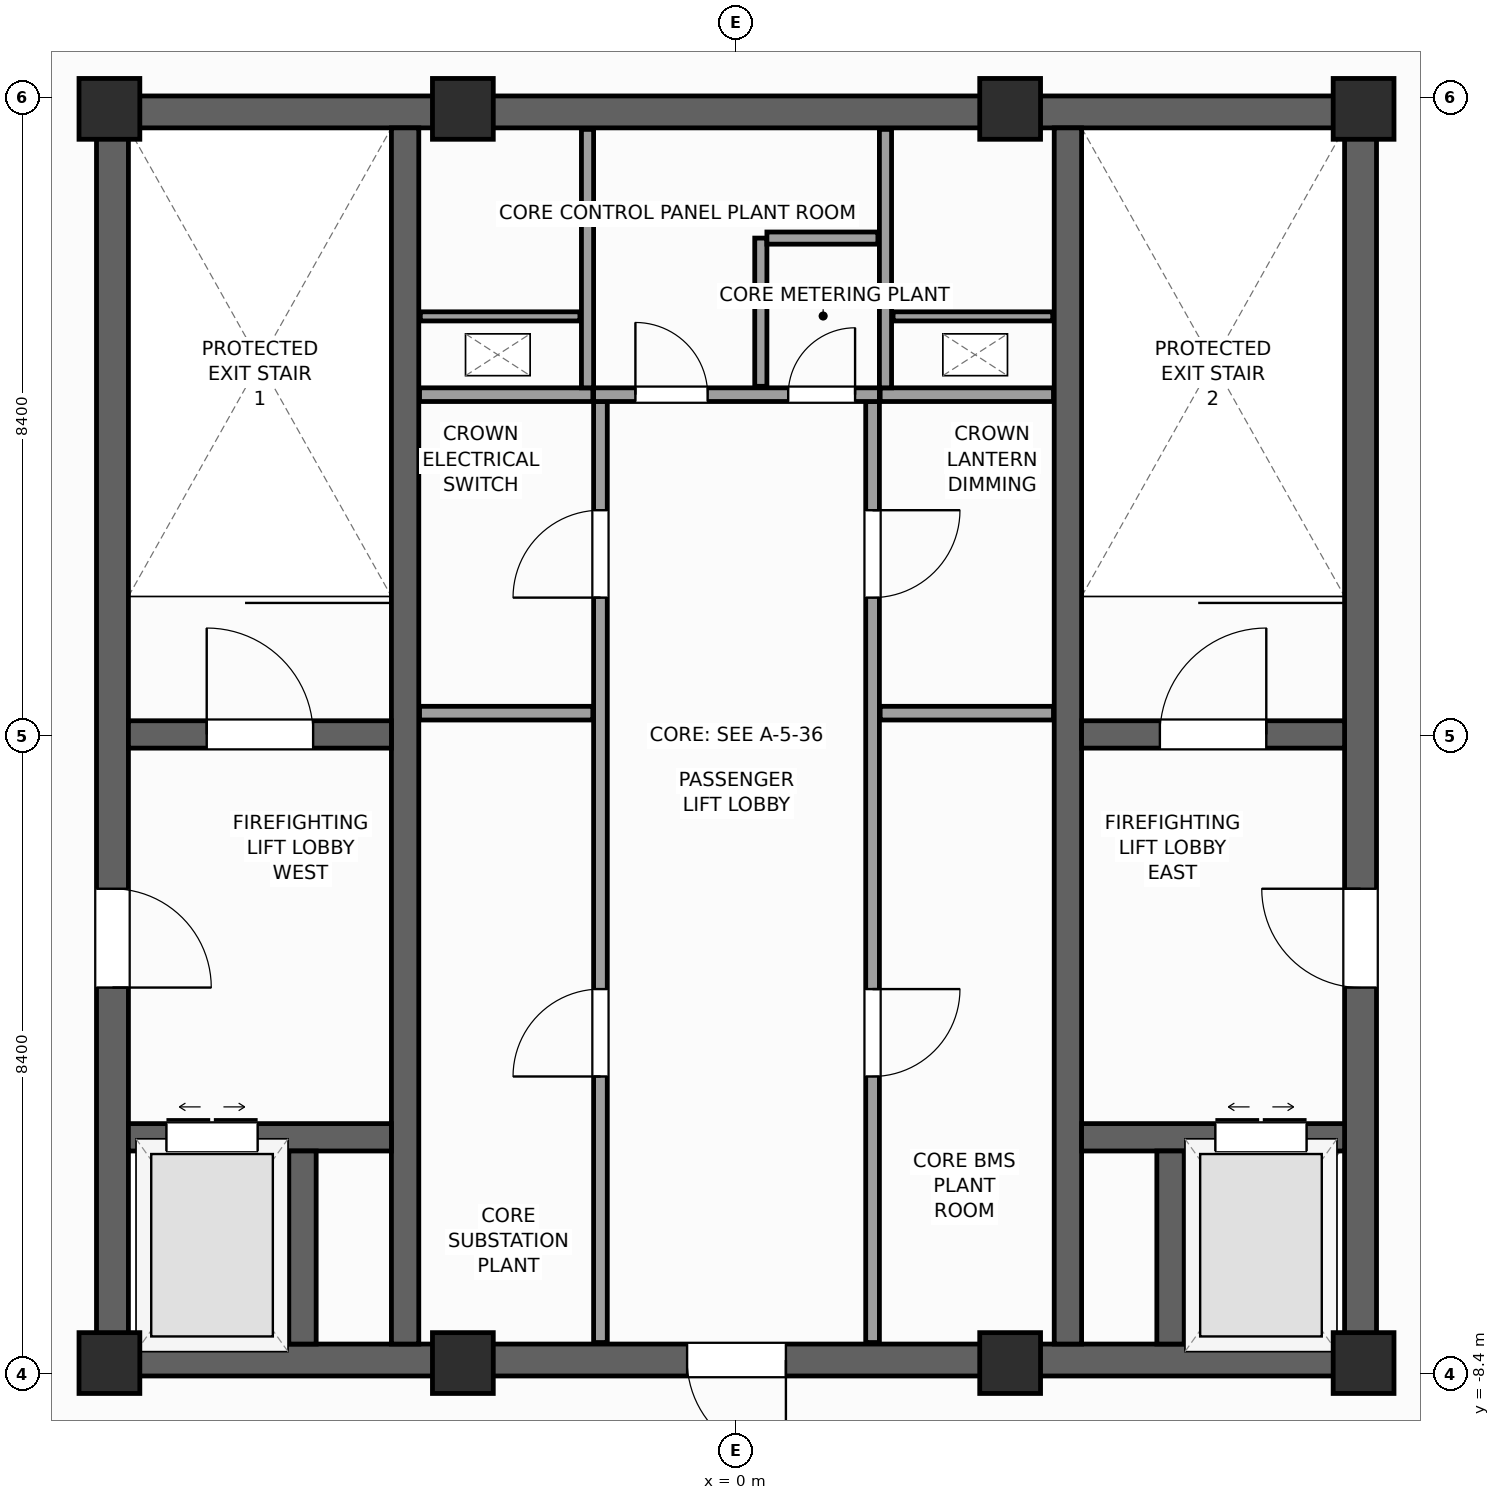
"""IFC4 building model, lengths in metres.
Left out: names, types, materials, properties, quantities, classifications, styles, units other than length and angle.
Written with IfcOpenShell. Run it as: python <this file> out.ifc"""

import sys

from ifc_helpers import new_model, si_unit, direction, frame, frame_2d, origin, origin_2d, place, context, subcontext, project, spatial, rectangle, extrude, source, transform, mapped, element, fill, save


model = new_model("IFC4")
c1 = context("Model", 3, precision=1e-05, world=origin(), true_north=direction((0.0, 1.0)))
c2 = subcontext(c1, "Body", "Model", "MODEL_VIEW")
j1 = project(units=[si_unit("LENGTHUNIT", "METRE"), si_unit("PLANEANGLEUNIT", "RADIAN")], contexts=[c1])
p1 = place(None, origin())
s1 = spatial("IfcSite", under=j1, at=p1, CompositionType="ELEMENT")
p2 = place(p1, origin())
s2 = spatial("IfcBuilding", under=s1, at=p2, CompositionType="ELEMENT")
p3 = place(p2, frame((0.0, 0.0, 341.6)))
s3 = spatial("IfcBuildingStorey", under=s2, at=p3, CompositionType="ELEMENT", Elevation=341.6)
p4 = place(p3, frame((-8.42, -8.21, 0.0), z_axis=(0.0, 0.0, 1.0), x_axis=(1.0, 0.0, 0.0)))
e1 = element("IfcWall", 1, at=p4, inside=s3, PredefinedType="SHEAR", context=c2, shape_type="SweptSolid", body=[
    extrude(rectangle(XDim=16.84, YDim=0.42, at=frame_2d((8.42, 0.0))), origin(), (0.0, 0.0, 1.0), 4.0),
])
p5 = place(p4, frame((7.77, 0.0, 0.0)))
e2 = element("IfcOpeningElement", 2, at=p5, cuts=e1, PredefinedType="OPENING", context=c2, shape_type="SweptSolid", body=[
    extrude(rectangle(XDim=1.3, YDim=2.2, at=frame_2d((0.65, 1.1))), frame((0.0, 0.22, 0.0), z_axis=(0.0, -1.0, 0.0), x_axis=(1.0, 0.0, 0.0)), (0.0, 0.0, 1.0), 0.44),
])
p6 = place(p3, frame((-8.42, 8.21, 0.0), z_axis=(0.0, 0.0, 1.0), x_axis=(1.0, 0.0, 0.0)))
e3 = element("IfcWall", 3, at=p6, inside=s3, PredefinedType="SHEAR", context=c2, shape_type="SweptSolid", body=[
    extrude(rectangle(XDim=16.84, YDim=0.42, at=frame_2d((8.42, 0.0))), origin(), (0.0, 0.0, 1.0), 4.0),
])
p7 = place(p3, frame((-8.21, -8.0, 0.0), z_axis=(0.0, 0.0, 1.0), x_axis=(0.0, 1.0, 0.0)))
e4 = element("IfcWall", 4, at=p7, inside=s3, PredefinedType="SHEAR", context=c2, shape_type="SweptSolid", body=[
    extrude(rectangle(XDim=16.0, YDim=0.42, at=frame_2d((8.0, 0.0))), origin(), (0.0, 0.0, 1.0), 4.0),
])
p8 = place(p7, frame((4.69, 0.0, 0.0)))
e5 = element("IfcOpeningElement", 5, at=p8, cuts=e4, PredefinedType="OPENING", context=c2, shape_type="SweptSolid", body=[
    extrude(rectangle(XDim=1.3, YDim=2.2, at=frame_2d((0.65, 1.1))), frame((0.0, 0.22, 0.0), z_axis=(0.0, -1.0, 0.0), x_axis=(1.0, 0.0, 0.0)), (0.0, 0.0, 1.0), 0.44),
])
p9 = place(p3, frame((8.21, -8.0, 0.0), z_axis=(0.0, 0.0, 1.0), x_axis=(0.0, 1.0, 0.0)))
e6 = element("IfcWall", 6, at=p9, inside=s3, PredefinedType="SHEAR", context=c2, shape_type="SweptSolid", body=[
    extrude(rectangle(XDim=16.0, YDim=0.42, at=frame_2d((8.0, 0.0))), origin(), (0.0, 0.0, 1.0), 4.0),
])
p10 = place(p9, frame((4.69, 0.0, 0.0)))
e7 = element("IfcOpeningElement", 7, at=p10, cuts=e6, PredefinedType="OPENING", context=c2, shape_type="SweptSolid", body=[
    extrude(rectangle(XDim=1.3, YDim=2.2, at=frame_2d((0.65, 1.1))), frame((0.0, 0.22, 0.0), z_axis=(0.0, -1.0, 0.0), x_axis=(1.0, 0.0, 0.0)), (0.0, 0.0, 1.0), 0.44),
])
for number, where, z_axis, x_axis in (
    (8, (-4.36, -8.0, 0.0), (0.0, 0.0, 1.0), (0.0, 1.0, 0.0)),
    (9, (4.36, -8.0, 0.0), (0.0, 0.0, 1.0), (0.0, 1.0, 0.0)),
):
    element("IfcWall", number, at=place(p3, frame(where, z_axis=z_axis, x_axis=x_axis)), inside=s3, PredefinedType="SHEAR", context=c2, shape_type="SweptSolid", body=[
        extrude(rectangle(XDim=16.0, YDim=0.36, at=frame_2d((8.0, 0.0))), origin(), (0.0, 0.0, 1.0), 4.0),
    ])
p11 = place(p3, frame((-8.0, 0.02, 0.0), z_axis=(0.0, 0.0, 1.0), x_axis=(1.0, 0.0, 0.0)))
e10 = element("IfcWall", 10, at=p11, inside=s3, PredefinedType="SHEAR", context=c2, shape_type="SweptSolid", body=[
    extrude(rectangle(XDim=3.46, YDim=0.36, at=frame_2d((1.73, 0.0))), origin(), (0.0, 0.0, 1.0), 4.0),
])
p12 = place(p11, frame((1.03, 0.0, 0.0)))
e11 = element("IfcOpeningElement", 11, at=p12, cuts=e10, PredefinedType="OPENING", context=c2, shape_type="SweptSolid", body=[
    extrude(rectangle(XDim=1.4, YDim=2.2, at=frame_2d((0.7, 1.1))), frame((0.0, 0.19, 0.0), z_axis=(0.0, -1.0, 0.0), x_axis=(1.0, 0.0, 0.0)), (0.0, 0.0, 1.0), 0.38),
])
p13 = place(p3, frame((4.54, 0.02, 0.0), z_axis=(0.0, 0.0, 1.0), x_axis=(1.0, 0.0, 0.0)))
e12 = element("IfcWall", 12, at=p13, inside=s3, PredefinedType="SHEAR", context=c2, shape_type="SweptSolid", body=[
    extrude(rectangle(XDim=3.46, YDim=0.36, at=frame_2d((1.73, 0.0))), origin(), (0.0, 0.0, 1.0), 4.0),
])
p14 = place(p13, frame((1.03, 0.0, 0.0)))
e13 = element("IfcOpeningElement", 13, at=p14, cuts=e12, PredefinedType="OPENING", context=c2, shape_type="SweptSolid", body=[
    extrude(rectangle(XDim=1.4, YDim=2.2, at=frame_2d((0.7, 1.1))), frame((0.0, 0.19, 0.0), z_axis=(0.0, -1.0, 0.0), x_axis=(1.0, 0.0, 0.0)), (0.0, 0.0, 1.0), 0.38),
])
p15 = place(p3, frame((-8.0, -5.28, 0.0), z_axis=(0.0, 0.0, 1.0), x_axis=(1.0, 0.0, 0.0)))
e14 = element("IfcWall", 14, at=p15, inside=s3, PredefinedType="SHEAR", context=c2, shape_type="SweptSolid", body=[
    extrude(rectangle(XDim=3.46, YDim=0.36, at=frame_2d((1.73, 0.0))), origin(), (0.0, 0.0, 1.0), 4.0),
])
p16 = place(p15, frame((0.5, 0.0, 0.0)))
e15 = element("IfcOpeningElement", 15, at=p16, cuts=e14, PredefinedType="OPENING", context=c2, shape_type="SweptSolid", body=[
    extrude(rectangle(XDim=1.2, YDim=2.25, at=frame_2d((0.6, 1.125))), frame((0.0, 0.19, 0.0), z_axis=(0.0, -1.0, 0.0), x_axis=(1.0, 0.0, 0.0)), (0.0, 0.0, 1.0), 0.38),
])
p17 = place(p3, frame((4.54, -5.28, 0.0), z_axis=(0.0, 0.0, 1.0), x_axis=(1.0, 0.0, 0.0)))
e16 = element("IfcWall", 16, at=p17, inside=s3, PredefinedType="SHEAR", context=c2, shape_type="SweptSolid", body=[
    extrude(rectangle(XDim=3.46, YDim=0.36, at=frame_2d((1.73, 0.0))), origin(), (0.0, 0.0, 1.0), 4.0),
])
p18 = place(p17, frame((1.76, 0.0, 0.0)))
e17 = element("IfcOpeningElement", 17, at=p18, cuts=e16, PredefinedType="OPENING", context=c2, shape_type="SweptSolid", body=[
    extrude(rectangle(XDim=1.2, YDim=2.25, at=frame_2d((0.6, 1.125))), frame((0.0, 0.19, 0.0), z_axis=(0.0, -1.0, 0.0), x_axis=(1.0, 0.0, 0.0)), (0.0, 0.0, 1.0), 0.38),
])
for number, where, z_axis, x_axis in (
    (18, (-5.71, -8.0, 0.0), (0.0, 0.0, 1.0), (0.0, 1.0, 0.0)),
    (19, (5.71, -8.0, 0.0), (0.0, 0.0, 1.0), (0.0, 1.0, 0.0)),
):
    element("IfcWall", number, at=place(p3, frame(where, z_axis=z_axis, x_axis=x_axis)), inside=s3, PredefinedType="SHEAR", context=c2, shape_type="SweptSolid", body=[
        extrude(rectangle(XDim=2.54, YDim=0.36, at=frame_2d((1.27, 0.0))), origin(), (0.0, 0.0, 1.0), 4.0),
    ])
m1 = source(origin(), c2, "Body", "SweptSolid", [
    extrude(rectangle(XDim=0.8, YDim=0.8, at=origin_2d()), origin(), (0.0, 0.0, 1.0), 4.0),
])
for number, where, z_axis, x_axis in (
    (20, (-8.25, -8.25, 0.0), (0.0, 0.0, 1.0), (1.0, 0.0, 0.0)),
    (21, (8.25, -8.25, 0.0), (0.0, 0.0, 1.0), (1.0, 0.0, 0.0)),
    (22, (8.25, 8.25, 0.0), (0.0, 0.0, 1.0), (1.0, 0.0, 0.0)),
    (23, (-8.25, 8.25, 0.0), (0.0, 0.0, 1.0), (1.0, 0.0, 0.0)),
    (24, (-3.6, -8.25, 0.0), (0.0, 0.0, 1.0), (1.0, 0.0, 0.0)),
    (25, (3.6, -8.25, 0.0), (0.0, 0.0, 1.0), (1.0, 0.0, 0.0)),
    (26, (-3.6, 8.25, 0.0), (0.0, 0.0, 1.0), (1.0, 0.0, 0.0)),
    (27, (3.6, 8.25, 0.0), (0.0, 0.0, 1.0), (1.0, 0.0, 0.0)),
):
    element("IfcColumn", number, at=place(p3, frame(where, z_axis=z_axis, x_axis=x_axis)), inside=s3, PredefinedType="PILASTER", context=c2, shape_type="MappedRepresentation", body=[
        mapped(m1, transform((0.0, 0.0, 0.0), scale=1.0)),
    ])
p19 = place(p3, frame((-1.79, -7.98, 0.0), z_axis=(0.0, 0.0, 1.0), x_axis=(0.0, 1.0, 0.0)))
e28 = element("IfcWall", 28, at=p19, inside=s3, PredefinedType="PARTITIONING", context=c2, shape_type="SweptSolid", body=[
    extrude(rectangle(XDim=12.38, YDim=0.18, at=frame_2d((6.19, 0.0))), origin(), (0.0, 0.0, 1.0), 3.65),
])
p20 = place(p19, frame((3.5, 0.0, 0.0)))
e29 = element("IfcOpeningElement", 29, at=p20, cuts=e28, PredefinedType="OPENING", context=c2, shape_type="SweptSolid", body=[
    extrude(rectangle(XDim=1.15, YDim=2.25, at=frame_2d((0.575, 1.125))), frame((0.0, 0.1, 0.0), z_axis=(0.0, -1.0, 0.0), x_axis=(1.0, 0.0, 0.0)), (0.0, 0.0, 1.0), 0.2),
])
p21 = place(p19, frame((9.8, 0.0, 0.0)))
e30 = element("IfcOpeningElement", 30, at=p21, cuts=e28, PredefinedType="OPENING", context=c2, shape_type="SweptSolid", body=[
    extrude(rectangle(XDim=1.15, YDim=2.25, at=frame_2d((0.575, 1.125))), frame((0.0, 0.1, 0.0), z_axis=(0.0, -1.0, 0.0), x_axis=(1.0, 0.0, 0.0)), (0.0, 0.0, 1.0), 0.2),
])
p22 = place(p3, frame((1.79, -7.98, 0.0), z_axis=(0.0, 0.0, 1.0), x_axis=(0.0, 1.0, 0.0)))
e31 = element("IfcWall", 31, at=p22, inside=s3, PredefinedType="PARTITIONING", context=c2, shape_type="SweptSolid", body=[
    extrude(rectangle(XDim=12.38, YDim=0.18, at=frame_2d((6.19, 0.0))), origin(), (0.0, 0.0, 1.0), 3.65),
])
p23 = place(p22, frame((3.5, 0.0, 0.0)))
e32 = element("IfcOpeningElement", 32, at=p23, cuts=e31, PredefinedType="OPENING", context=c2, shape_type="SweptSolid", body=[
    extrude(rectangle(XDim=1.15, YDim=2.25, at=frame_2d((0.575, 1.125))), frame((0.0, 0.1, 0.0), z_axis=(0.0, -1.0, 0.0), x_axis=(1.0, 0.0, 0.0)), (0.0, 0.0, 1.0), 0.2),
])
p24 = place(p22, frame((9.8, 0.0, 0.0)))
e33 = element("IfcOpeningElement", 33, at=p24, cuts=e31, PredefinedType="OPENING", context=c2, shape_type="SweptSolid", body=[
    extrude(rectangle(XDim=1.15, YDim=2.25, at=frame_2d((0.575, 1.125))), frame((0.0, 0.1, 0.0), z_axis=(0.0, -1.0, 0.0), x_axis=(1.0, 0.0, 0.0)), (0.0, 0.0, 1.0), 0.2),
])
p25 = place(p3, frame((-1.88, 4.49, 0.0), z_axis=(0.0, 0.0, 1.0), x_axis=(1.0, 0.0, 0.0)))
e34 = element("IfcWall", 34, at=p25, inside=s3, PredefinedType="PARTITIONING", context=c2, shape_type="SweptSolid", body=[
    extrude(rectangle(XDim=3.76, YDim=0.18, at=frame_2d((1.88, 0.0))), origin(), (0.0, 0.0, 1.0), 3.65),
])
p26 = place(p25, frame((0.55, 0.0, 0.0)))
e35 = element("IfcOpeningElement", 35, at=p26, cuts=e34, PredefinedType="OPENING", context=c2, shape_type="SweptSolid", body=[
    extrude(rectangle(XDim=0.95, YDim=2.1, at=frame_2d((0.475, 1.05))), frame((0.0, 0.1, 0.0), z_axis=(0.0, -1.0, 0.0), x_axis=(1.0, 0.0, 0.0)), (0.0, 0.0, 1.0), 0.2),
])
p27 = place(p25, frame((2.56, 0.0, 0.0)))
e36 = element("IfcOpeningElement", 36, at=p27, cuts=e34, PredefinedType="OPENING", context=c2, shape_type="SweptSolid", body=[
    extrude(rectangle(XDim=0.88, YDim=2.1, at=frame_2d((0.44, 1.05))), frame((0.0, 0.1, 0.0), z_axis=(0.0, -1.0, 0.0), x_axis=(1.0, 0.0, 0.0)), (0.0, 0.0, 1.0), 0.2),
])
for number, where, z_axis, x_axis in (
    (37, (-4.17, 0.3, 0.0), (0.0, 0.0, 1.0), (1.0, 0.0, 0.0)),
    (38, (1.89, 0.3, 0.0), (0.0, 0.0, 1.0), (1.0, 0.0, 0.0)),
    (39, (-4.17, 4.49, 0.0), (0.0, 0.0, 1.0), (1.0, 0.0, 0.0)),
    (40, (1.89, 4.49, 0.0), (0.0, 0.0, 1.0), (1.0, 0.0, 0.0)),
):
    element("IfcWall", number, at=place(p3, frame(where, z_axis=z_axis, x_axis=x_axis)), inside=s3, PredefinedType="PARTITIONING", context=c2, shape_type="SweptSolid", body=[
        extrude(rectangle(XDim=2.28, YDim=0.18, at=frame_2d((1.14, 0.0))), origin(), (0.0, 0.0, 1.0), 3.65),
    ])
for number, where, z_axis, x_axis in (
    (41, (-1.96, 4.58, 0.0), (0.0, 0.0, 1.0), (0.0, 1.0, 0.0)),
    (42, (1.96, 4.58, 0.0), (0.0, 0.0, 1.0), (0.0, 1.0, 0.0)),
):
    element("IfcWall", number, at=place(p3, frame(where, z_axis=z_axis, x_axis=x_axis)), inside=s3, PredefinedType="PARTITIONING", context=c2, shape_type="SweptSolid", body=[
        extrude(rectangle(XDim=3.4, YDim=0.16, at=frame_2d((1.7, 0.0))), origin(), (0.0, 0.0, 1.0), 3.65),
    ])
for number, where, z_axis, x_axis in (
    (43, (-4.16, 5.52, 0.0), (0.0, 0.0, 1.0), (1.0, 0.0, 0.0)),
    (44, (2.06, 5.52, 0.0), (0.0, 0.0, 1.0), (1.0, 0.0, 0.0)),
):
    element("IfcWall", number, at=place(p3, frame(where, z_axis=z_axis, x_axis=x_axis)), inside=s3, PredefinedType="PARTITIONING", context=c2, shape_type="SweptSolid", body=[
        extrude(rectangle(XDim=2.1, YDim=0.12, at=frame_2d((1.05, 0.0))), origin(), (0.0, 0.0, 1.0), 3.65),
    ])
p28 = place(p3, frame((0.32, 4.6, 0.0), z_axis=(0.0, 0.0, 1.0), x_axis=(0.0, 1.0, 0.0)))
e45 = element("IfcWall", 45, at=p28, inside=s3, PredefinedType="PARTITIONING", context=c2, shape_type="SweptSolid", body=[
    extrude(rectangle(XDim=1.95, YDim=0.16, at=frame_2d((0.975, 0.0))), origin(), (0.0, 0.0, 1.0), 3.65),
])
p29 = place(p3, frame((0.4, 6.55, 0.0), z_axis=(0.0, 0.0, 1.0), x_axis=(1.0, 0.0, 0.0)))
e46 = element("IfcWall", 46, at=p29, inside=s3, PredefinedType="PARTITIONING", context=c2, shape_type="SweptSolid", body=[
    extrude(rectangle(XDim=1.46, YDim=0.16, at=frame_2d((0.73, 0.0))), origin(), (0.0, 0.0, 1.0), 3.65),
])
m2 = source(origin(), c2, "Body", "SweptSolid", [
    extrude(rectangle(XDim=1.4, YDim=2.2, at=frame_2d((0.7, 1.1))), frame((0.0, 0.025, 0.0), z_axis=(0.0, -1.0, 0.0), x_axis=(1.0, 0.0, 0.0)), (0.0, 0.0, 1.0), 0.05),
])
p30 = place(p12, origin())
e47 = element("IfcDoor", 47, at=p30, inside=s3, OperationType="SINGLE_SWING_LEFT", PredefinedType="DOOR", context=c2, shape_type="MappedRepresentation", body=[
    mapped(m2, transform((0.0, 0.0, 0.0), scale=1.0)),
])
fill(e11, e47)
p31 = place(p14, origin())
e48 = element("IfcDoor", 48, at=p31, inside=s3, OperationType="SINGLE_SWING_RIGHT", PredefinedType="DOOR", context=c2, shape_type="MappedRepresentation", body=[
    mapped(m2, transform((0.0, 0.0, 0.0), scale=1.0)),
])
fill(e13, e48)
m3 = source(origin(), c2, "Body", "SweptSolid", [
    extrude(rectangle(XDim=1.3, YDim=2.2, at=frame_2d((0.65, 1.1))), frame((0.0, 0.025, 0.0), z_axis=(0.0, -1.0, 0.0), x_axis=(1.0, 0.0, 0.0)), (0.0, 0.0, 1.0), 0.05),
])
p32 = place(p8, frame((1.3, 0.0, 0.0), z_axis=(0.0, 0.0, 1.0), x_axis=(-1.0, 0.0, 0.0)))
e49 = element("IfcDoor", 49, at=p32, inside=s3, OperationType="SINGLE_SWING_LEFT", PredefinedType="DOOR", context=c2, shape_type="MappedRepresentation", body=[
    mapped(m3, transform((0.0, 0.0, 0.0), scale=1.0)),
])
fill(e5, e49)
p33 = place(p10, origin())
e50 = element("IfcDoor", 50, at=p33, inside=s3, OperationType="SINGLE_SWING_RIGHT", PredefinedType="DOOR", context=c2, shape_type="MappedRepresentation", body=[
    mapped(m3, transform((0.0, 0.0, 0.0), scale=1.0)),
])
fill(e7, e50)
p34 = place(p5, frame((1.3, 0.0, 0.0), z_axis=(0.0, 0.0, 1.0), x_axis=(-1.0, 0.0, 0.0)))
e51 = element("IfcDoor", 51, at=p34, inside=s3, OperationType="SINGLE_SWING_RIGHT", PredefinedType="DOOR", context=c2, shape_type="MappedRepresentation", body=[
    mapped(m3, transform((0.0, 0.0, 0.0), scale=1.0)),
])
fill(e2, e51)
m4 = source(origin(), c2, "Body", "SweptSolid", [
    extrude(rectangle(XDim=1.2, YDim=2.25, at=frame_2d((0.6, 1.125))), frame((0.0, 0.025, 0.0), z_axis=(0.0, -1.0, 0.0), x_axis=(1.0, 0.0, 0.0)), (0.0, 0.0, 1.0), 0.05),
])
p35 = place(p16, origin())
e52 = element("IfcDoor", 52, at=p35, inside=s3, OperationType="DOUBLE_DOOR_SLIDING", PredefinedType="DOOR", context=c2, shape_type="MappedRepresentation", body=[
    mapped(m4, transform((0.0, 0.0, 0.0), scale=1.0)),
])
fill(e15, e52)
p36 = place(p18, origin())
e53 = element("IfcDoor", 53, at=p36, inside=s3, OperationType="DOUBLE_DOOR_SLIDING", PredefinedType="DOOR", context=c2, shape_type="MappedRepresentation", body=[
    mapped(m4, transform((0.0, 0.0, 0.0), scale=1.0)),
])
fill(e17, e53)
m5 = source(origin(), c2, "Body", "SweptSolid", [
    extrude(rectangle(XDim=1.15, YDim=2.25, at=frame_2d((0.575, 1.125))), frame((0.0, 0.025, 0.0), z_axis=(0.0, -1.0, 0.0), x_axis=(1.0, 0.0, 0.0)), (0.0, 0.0, 1.0), 0.05),
])
p37 = place(p20, origin())
e54 = element("IfcDoor", 54, at=p37, inside=s3, OperationType="SINGLE_SWING_LEFT", PredefinedType="DOOR", context=c2, shape_type="MappedRepresentation", body=[
    mapped(m5, transform((0.0, 0.0, 0.0), scale=1.0)),
])
fill(e29, e54)
p38 = place(p23, frame((1.15, 0.0, 0.0), z_axis=(0.0, 0.0, 1.0), x_axis=(-1.0, 0.0, 0.0)))
e55 = element("IfcDoor", 55, at=p38, inside=s3, OperationType="SINGLE_SWING_RIGHT", PredefinedType="DOOR", context=c2, shape_type="MappedRepresentation", body=[
    mapped(m5, transform((0.0, 0.0, 0.0), scale=1.0)),
])
fill(e32, e55)
p39 = place(p21, origin())
e56 = element("IfcDoor", 56, at=p39, inside=s3, OperationType="SINGLE_SWING_LEFT", PredefinedType="DOOR", context=c2, shape_type="MappedRepresentation", body=[
    mapped(m5, transform((0.0, 0.0, 0.0), scale=1.0)),
])
fill(e30, e56)
p40 = place(p24, frame((1.15, 0.0, 0.0), z_axis=(0.0, 0.0, 1.0), x_axis=(-1.0, 0.0, 0.0)))
e57 = element("IfcDoor", 57, at=p40, inside=s3, OperationType="SINGLE_SWING_RIGHT", PredefinedType="DOOR", context=c2, shape_type="MappedRepresentation", body=[
    mapped(m5, transform((0.0, 0.0, 0.0), scale=1.0)),
])
fill(e33, e57)
m6 = source(origin(), c2, "Body", "SweptSolid", [
    extrude(rectangle(XDim=0.95, YDim=2.1, at=frame_2d((0.475, 1.05))), frame((0.0, 0.025, 0.0), z_axis=(0.0, -1.0, 0.0), x_axis=(1.0, 0.0, 0.0)), (0.0, 0.0, 1.0), 0.05),
])
p41 = place(p26, origin())
e58 = element("IfcDoor", 58, at=p41, inside=s3, OperationType="SINGLE_SWING_LEFT", PredefinedType="DOOR", context=c2, shape_type="MappedRepresentation", body=[
    mapped(m6, transform((0.0, 0.0, 0.0), scale=1.0)),
])
fill(e35, e58)
m7 = source(origin(), c2, "Body", "SweptSolid", [
    extrude(rectangle(XDim=0.88, YDim=2.1, at=frame_2d((0.44, 1.05))), frame((0.0, 0.025, 0.0), z_axis=(0.0, -1.0, 0.0), x_axis=(1.0, 0.0, 0.0)), (0.0, 0.0, 1.0), 0.05),
])
p42 = place(p27, origin())
e59 = element("IfcDoor", 59, at=p42, inside=s3, OperationType="SINGLE_SWING_RIGHT", PredefinedType="DOOR", context=c2, shape_type="MappedRepresentation", body=[
    mapped(m7, transform((0.0, 0.0, 0.0), scale=1.0)),
])
fill(e36, e59)
save(model, sys.argv[1])
